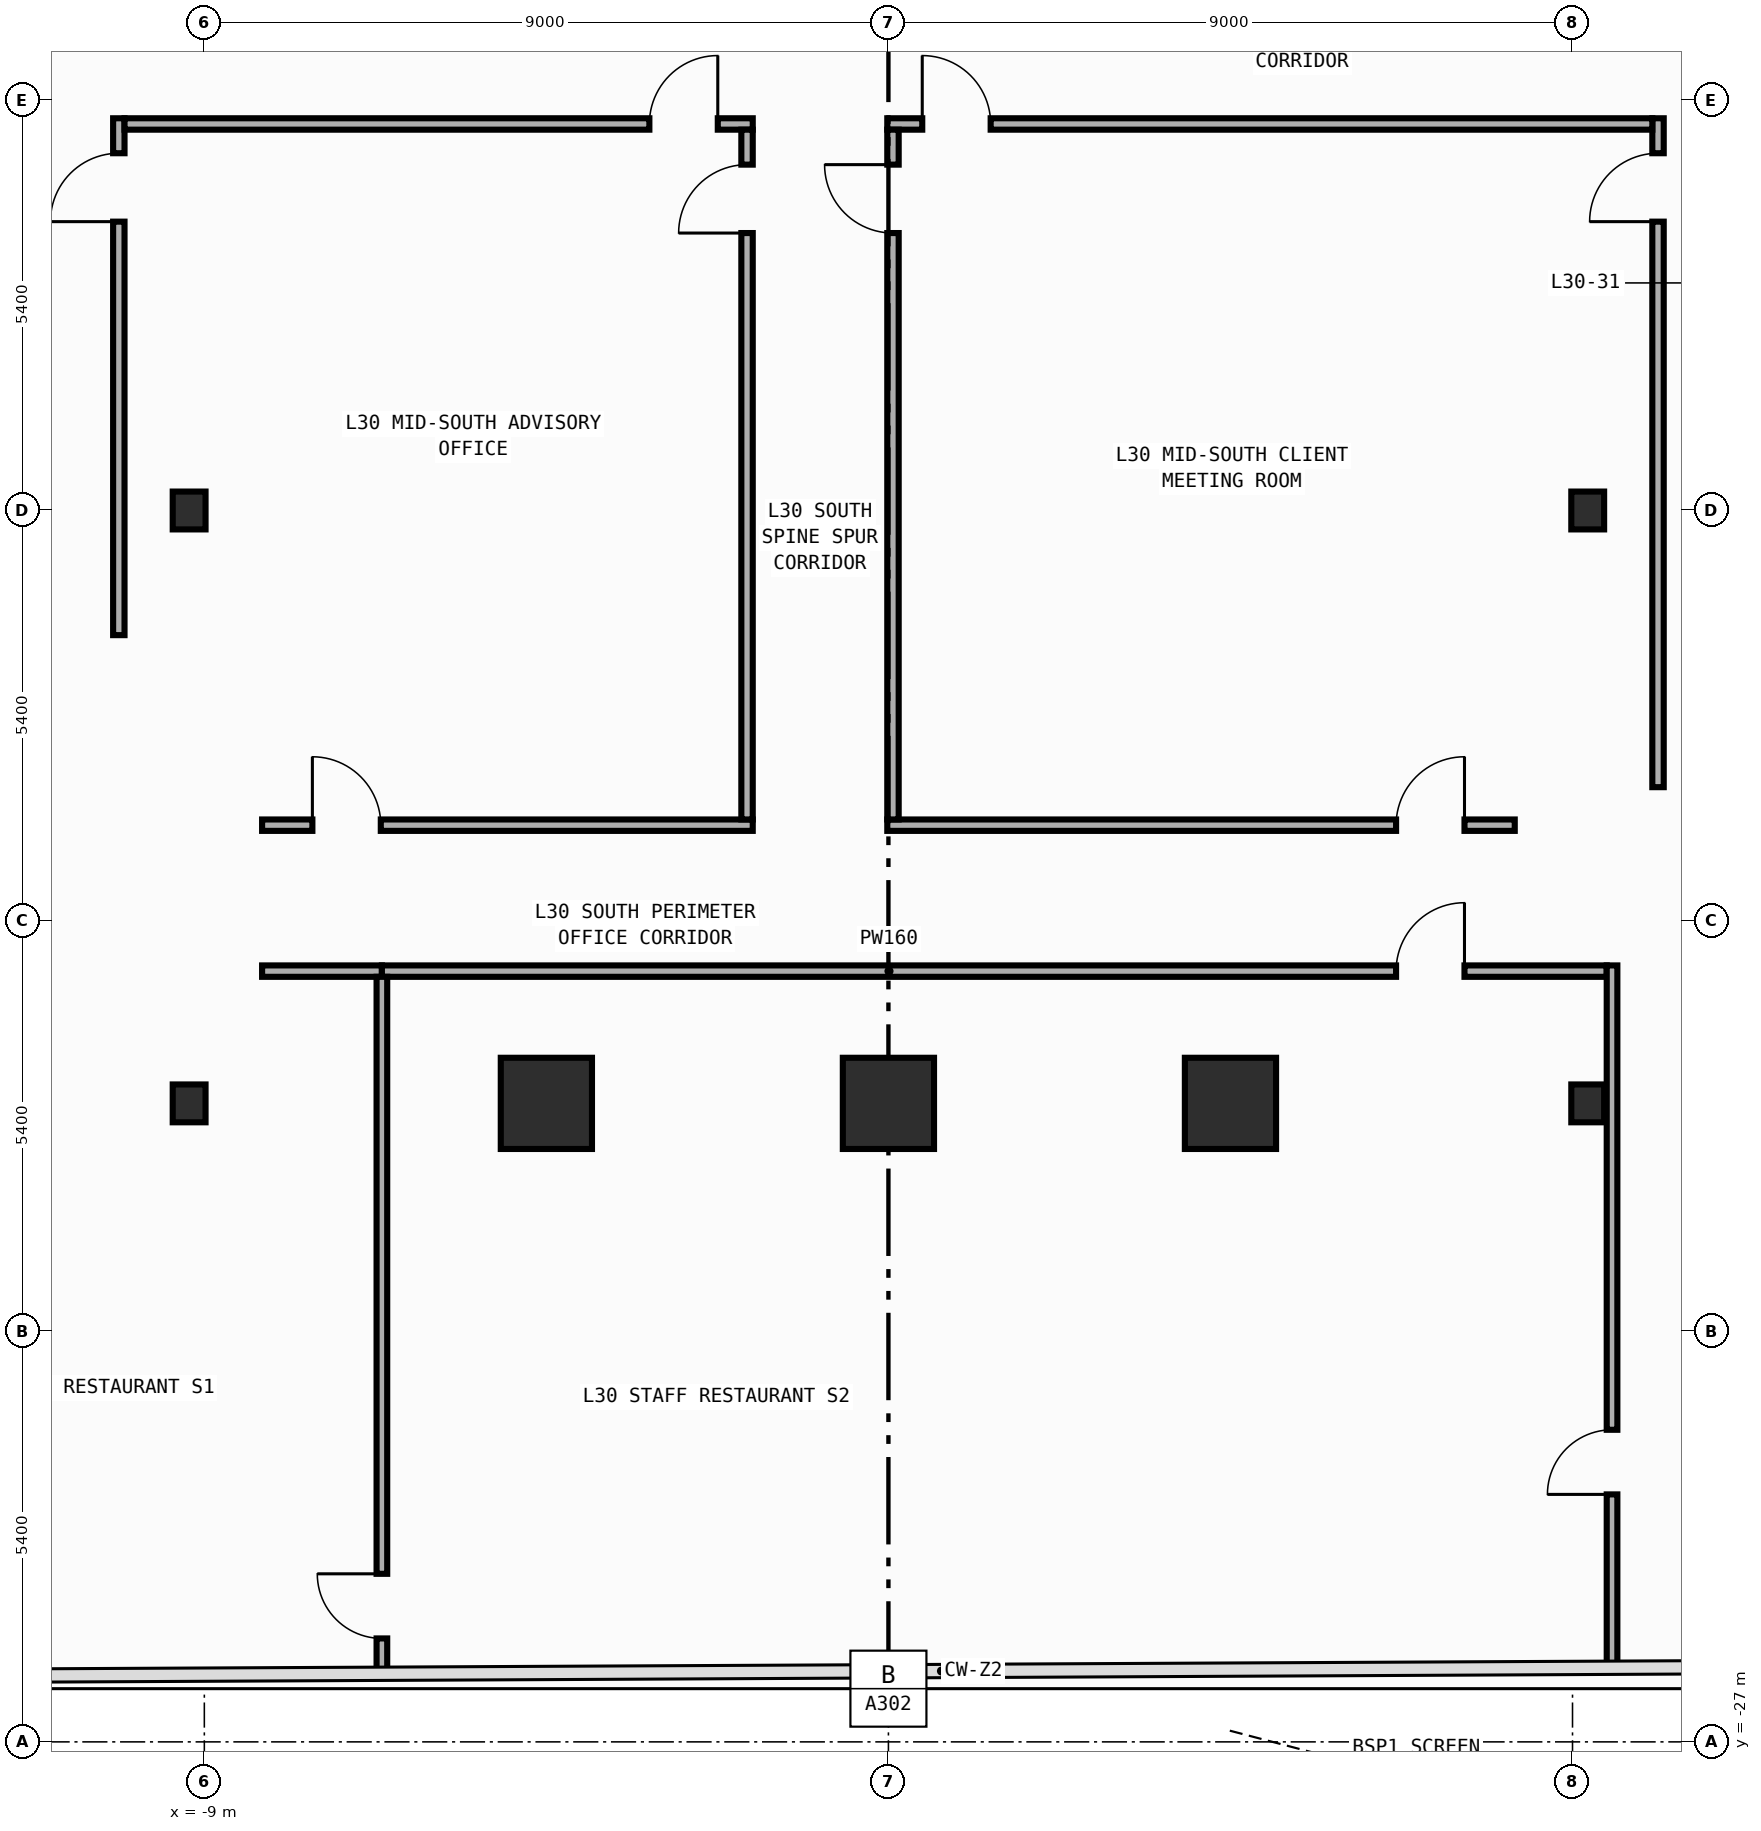
"""IFC4 building model, lengths in metres.
Left out: names, types, materials, properties, quantities, classifications, styles, units other than length and angle.
Written with IfcOpenShell. Run it as: python <this file> out.ifc"""

import sys

from ifc_helpers import new_model, si_unit, direction, frame, frame_2d, origin, origin_2d, place, context, subcontext, project, spatial, rectangle, i_section, extrude, element, fill, save


model = new_model("IFC4")
c1 = context("Model", 3, precision=1e-05, world=origin(), true_north=direction((0.0, 1.0)))
c2 = subcontext(c1, "Body", "Model", "MODEL_VIEW")
j1 = project(units=[si_unit("LENGTHUNIT", "METRE"), si_unit("PLANEANGLEUNIT", "RADIAN")], contexts=[c1])
p1 = place(None, origin())
s1 = spatial("IfcSite", under=j1, at=p1, CompositionType="ELEMENT")
p2 = place(p1, origin())
s2 = spatial("IfcBuilding", under=s1, at=p2, CompositionType="ELEMENT")
p3 = place(p2, frame((0.0, 0.0, 131.0)))
s3 = spatial("IfcBuildingStorey", under=s2, at=p3, CompositionType="ELEMENT", Elevation=131.0)
for number, where, z_axis, x_axis in (
    (1, (-9.2, -18.6, 0.0), (0.0, 0.0, 1.0), (1.0, 0.0, 0.0)),
    (2, (-9.2, -10.8, 0.0), (0.0, 0.0, 1.0), (1.0, 0.0, 0.0)),
    (3, (9.2, -18.6, 0.0), (0.0, 0.0, 1.0), (1.0, 0.0, 0.0)),
    (4, (9.2, -10.8, 0.0), (0.0, 0.0, 1.0), (1.0, 0.0, 0.0)),
):
    element("IfcColumn", number, at=place(p3, frame(where, z_axis=z_axis, x_axis=x_axis)), inside=s3, PredefinedType="COLUMN", context=c2, shape_type="SweptSolid", body=[
        extrude(i_section(OverallWidth=0.432, OverallDepth=0.498, WebThickness=0.045, FlangeThickness=0.07, FilletRadius=0.022, at=origin_2d()), origin(), (0.0, 0.0, 1.0), 4.2),
    ])
for number, where, z_axis, x_axis in (
    (5, (-4.5, -18.6, 0.0), (0.0, 0.0, 1.0), (1.0, 0.0, 0.0)),
    (6, (0.0, -18.6, 0.0), (0.0, 0.0, 1.0), (1.0, 0.0, 0.0)),
    (7, (4.5, -18.6, 0.0), (0.0, 0.0, 1.0), (1.0, 0.0, 0.0)),
):
    element("IfcColumn", number, at=place(p3, frame(where, z_axis=z_axis, x_axis=x_axis)), inside=s3, PredefinedType="COLUMN", context=c2, shape_type="SweptSolid", body=[
        extrude(rectangle(XDim=1.2, YDim=1.2, at=origin_2d()), origin(), (0.0, 0.0, 1.0), 4.2),
    ])
p4 = place(p3, frame((-10.125, -12.44, 0.0), z_axis=(0.0, 0.0, 1.0), x_axis=(0.0, 1.0, 0.0)))
e8 = element("IfcWall", 8, at=p4, inside=s3, PredefinedType="PARTITIONING", context=c2, shape_type="SweptSolid", body=[
    extrude(rectangle(XDim=6.8, YDim=0.15, at=frame_2d((3.4, 0.0))), origin(), (0.0, 0.0, 1.0), 3.94),
])
p5 = place(p4, frame((5.44, 0.0, 0.0)))
e9 = element("IfcOpeningElement", 9, at=p5, cuts=e8, PredefinedType="OPENING", context=c2, shape_type="SweptSolid", body=[
    extrude(rectangle(XDim=0.9, YDim=2.15, at=frame_2d((0.45, 1.075))), frame((0.0, 0.085, 0.0), z_axis=(0.0, -1.0, 0.0), x_axis=(1.0, 0.0, 0.0)), (0.0, 0.0, 1.0), 0.17),
])
p6 = place(p3, frame((10.125, -14.44, 0.0), z_axis=(0.0, 0.0, 1.0), x_axis=(0.0, 1.0, 0.0)))
e10 = element("IfcWall", 10, at=p6, inside=s3, PredefinedType="PARTITIONING", context=c2, shape_type="SweptSolid", body=[
    extrude(rectangle(XDim=8.8, YDim=0.15, at=frame_2d((4.4, 0.0))), origin(), (0.0, 0.0, 1.0), 3.94),
])
p7 = place(p6, frame((7.44, 0.0, 0.0)))
e11 = element("IfcOpeningElement", 11, at=p7, cuts=e10, PredefinedType="OPENING", context=c2, shape_type="SweptSolid", body=[
    extrude(rectangle(XDim=0.9, YDim=2.15, at=frame_2d((0.45, 1.075))), frame((0.0, 0.085, 0.0), z_axis=(0.0, -1.0, 0.0), x_axis=(1.0, 0.0, 0.0)), (0.0, 0.0, 1.0), 0.17),
])
p8 = place(p3, frame((-10.05, -5.715, 0.0), z_axis=(0.0, 0.0, 1.0), x_axis=(1.0, 0.0, 0.0)))
e12 = element("IfcWall", 12, at=p8, inside=s3, PredefinedType="PARTITIONING", context=c2, shape_type="SweptSolid", body=[
    extrude(rectangle(XDim=8.265, YDim=0.15, at=frame_2d((4.133, 0.0))), origin(), (0.0, 0.0, 1.0), 3.94),
])
p9 = place(p8, frame((6.905, 0.0, 0.0)))
e13 = element("IfcOpeningElement", 13, at=p9, cuts=e12, PredefinedType="OPENING", context=c2, shape_type="SweptSolid", body=[
    extrude(rectangle(XDim=0.9, YDim=2.15, at=frame_2d((0.45, 1.075))), frame((0.0, 0.085, 0.0), z_axis=(0.0, -1.0, 0.0), x_axis=(1.0, 0.0, 0.0)), (0.0, 0.0, 1.0), 0.17),
])
p10 = place(p3, frame((-0.015, -5.715, 0.0), z_axis=(0.0, 0.0, 1.0), x_axis=(1.0, 0.0, 0.0)))
e14 = element("IfcWall", 14, at=p10, inside=s3, PredefinedType="PARTITIONING", context=c2, shape_type="SweptSolid", body=[
    extrude(rectangle(XDim=10.065, YDim=0.15, at=frame_2d((5.032, 0.0))), origin(), (0.0, 0.0, 1.0), 3.94),
])
p11 = place(p10, frame((0.46, 0.0, 0.0)))
e15 = element("IfcOpeningElement", 15, at=p11, cuts=e14, PredefinedType="OPENING", context=c2, shape_type="SweptSolid", body=[
    extrude(rectangle(XDim=0.9, YDim=2.15, at=frame_2d((0.45, 1.075))), frame((0.0, 0.085, 0.0), z_axis=(0.0, -1.0, 0.0), x_axis=(1.0, 0.0, 0.0)), (0.0, 0.0, 1.0), 0.17),
])
p12 = place(p3, frame((-8.24, -16.86, 0.0), z_axis=(0.0, 0.0, 1.0), x_axis=(1.0, 0.0, 0.0)))
e16 = element("IfcWall", 16, at=p12, inside=s3, PredefinedType="PARTITIONING", context=c2, shape_type="SweptSolid", body=[
    extrude(rectangle(XDim=1.576, YDim=0.15, at=frame_2d((0.788, 0.0))), origin(), (0.0, 0.0, 1.0), 3.94),
])
p13 = place(p3, frame((-6.664, -16.86, 0.0), z_axis=(0.0, 0.0, 1.0), x_axis=(1.0, 0.0, 0.0)))
e17 = element("IfcWall", 17, at=p13, inside=s3, PredefinedType="PARTITIONING", context=c2, shape_type="SweptSolid", body=[
    extrude(rectangle(XDim=16.114, YDim=0.15, at=frame_2d((8.057, 0.0))), origin(), (0.0, 0.0, 1.0), 3.94),
])
p14 = place(p13, frame((13.343, 0.0, 0.0)))
e18 = element("IfcOpeningElement", 18, at=p14, cuts=e17, PredefinedType="OPENING", context=c2, shape_type="SweptSolid", body=[
    extrude(rectangle(XDim=0.9, YDim=2.15, at=frame_2d((0.45, 1.075))), frame((0.0, 0.085, 0.0), z_axis=(0.0, -1.0, 0.0), x_axis=(1.0, 0.0, 0.0)), (0.0, 0.0, 1.0), 0.17),
])
p15 = place(p3, frame((-8.24, -14.94, 0.0), z_axis=(0.0, 0.0, 1.0), x_axis=(1.0, 0.0, 0.0)))
e19 = element("IfcWall", 19, at=p15, inside=s3, PredefinedType="PARTITIONING", context=c2, shape_type="SweptSolid", body=[
    extrude(rectangle(XDim=6.455, YDim=0.15, at=frame_2d((3.228, 0.0))), origin(), (0.0, 0.0, 1.0), 3.94),
])
p16 = place(p15, frame((0.662, 0.0, 0.0)))
e20 = element("IfcOpeningElement", 20, at=p16, cuts=e19, PredefinedType="OPENING", context=c2, shape_type="SweptSolid", body=[
    extrude(rectangle(XDim=0.9, YDim=2.15, at=frame_2d((0.45, 1.075))), frame((0.0, 0.085, 0.0), z_axis=(0.0, -1.0, 0.0), x_axis=(1.0, 0.0, 0.0)), (0.0, 0.0, 1.0), 0.17),
])
p17 = place(p3, frame((-0.015, -14.94, 0.0), z_axis=(0.0, 0.0, 1.0), x_axis=(1.0, 0.0, 0.0)))
e21 = element("IfcWall", 21, at=p17, inside=s3, PredefinedType="PARTITIONING", context=c2, shape_type="SweptSolid", body=[
    extrude(rectangle(XDim=8.255, YDim=0.15, at=frame_2d((4.127, 0.0))), origin(), (0.0, 0.0, 1.0), 3.94),
])
p18 = place(p17, frame((6.694, 0.0, 0.0)))
e22 = element("IfcOpeningElement", 22, at=p18, cuts=e21, PredefinedType="OPENING", context=c2, shape_type="SweptSolid", body=[
    extrude(rectangle(XDim=0.9, YDim=2.15, at=frame_2d((0.45, 1.075))), frame((0.0, 0.085, 0.0), z_axis=(0.0, -1.0, 0.0), x_axis=(1.0, 0.0, 0.0)), (0.0, 0.0, 1.0), 0.17),
])
p19 = place(p3, frame((-1.86, -14.865, 0.0), z_axis=(0.0, 0.0, 1.0), x_axis=(0.0, 1.0, 0.0)))
e23 = element("IfcWall", 23, at=p19, inside=s3, PredefinedType="PARTITIONING", context=c2, shape_type="SweptSolid", body=[
    extrude(rectangle(XDim=9.075, YDim=0.15, at=frame_2d((4.538, 0.0))), origin(), (0.0, 0.0, 1.0), 3.94),
])
p20 = place(p19, frame((7.715, 0.0, 0.0)))
e24 = element("IfcOpeningElement", 24, at=p20, cuts=e23, PredefinedType="OPENING", context=c2, shape_type="SweptSolid", body=[
    extrude(rectangle(XDim=0.9, YDim=2.15, at=frame_2d((0.45, 1.075))), frame((0.0, 0.085, 0.0), z_axis=(0.0, -1.0, 0.0), x_axis=(1.0, 0.0, 0.0)), (0.0, 0.0, 1.0), 0.17),
])
p21 = place(p3, frame((0.06, -14.865, 0.0), z_axis=(0.0, 0.0, 1.0), x_axis=(0.0, 1.0, 0.0)))
e25 = element("IfcWall", 25, at=p21, inside=s3, PredefinedType="PARTITIONING", context=c2, shape_type="SweptSolid", body=[
    extrude(rectangle(XDim=9.075, YDim=0.15, at=frame_2d((4.538, 0.0))), origin(), (0.0, 0.0, 1.0), 3.94),
])
p22 = place(p21, frame((7.715, 0.0, 0.0)))
e26 = element("IfcOpeningElement", 26, at=p22, cuts=e25, PredefinedType="OPENING", context=c2, shape_type="SweptSolid", body=[
    extrude(rectangle(XDim=0.9, YDim=2.15, at=frame_2d((0.45, 1.075))), frame((0.0, 0.085, 0.0), z_axis=(0.0, -1.0, 0.0), x_axis=(1.0, 0.0, 0.0)), (0.0, 0.0, 1.0), 0.17),
])
p23 = place(p3, frame((-6.664, -26.099, 0.0), z_axis=(0.0, 0.0, 1.0), x_axis=(0.0, 1.0, 0.0)))
e27 = element("IfcWall", 27, at=p23, inside=s3, PredefinedType="PARTITIONING", context=c2, shape_type="SweptSolid", body=[
    extrude(rectangle(XDim=9.164, YDim=0.14, at=frame_2d((4.582, 0.0))), origin(), (0.0, 0.0, 1.0), 3.94),
])
p24 = place(p23, frame((0.46, 0.0, 0.0)))
e28 = element("IfcOpeningElement", 28, at=p24, cuts=e27, PredefinedType="OPENING", context=c2, shape_type="SweptSolid", body=[
    extrude(rectangle(XDim=0.85, YDim=2.1, at=frame_2d((0.425, 1.05))), frame((0.0, 0.08, 0.0), z_axis=(0.0, -1.0, 0.0), x_axis=(1.0, 0.0, 0.0)), (0.0, 0.0, 1.0), 0.16),
])
p25 = place(p3, frame((9.52, -26.02, 0.0), z_axis=(0.0, 0.0, 1.0), x_axis=(0.0, 1.0, 0.0)))
e29 = element("IfcWall", 29, at=p25, inside=s3, PredefinedType="PARTITIONING", context=c2, shape_type="SweptSolid", body=[
    extrude(rectangle(XDim=9.235, YDim=0.14, at=frame_2d((4.618, 0.0))), origin(), (0.0, 0.0, 1.0), 3.24),
])
p26 = place(p25, frame((2.276, 0.0, 0.0)))
e30 = element("IfcOpeningElement", 30, at=p26, cuts=e29, PredefinedType="OPENING", context=c2, shape_type="SweptSolid", body=[
    extrude(rectangle(XDim=0.85, YDim=2.1, at=frame_2d((0.425, 1.05))), frame((0.0, 0.08, 0.0), z_axis=(0.0, -1.0, 0.0), x_axis=(1.0, 0.0, 0.0)), (0.0, 0.0, 1.0), 0.16),
])
p27 = place(p5, origin())
e31 = element("IfcDoor", 31, at=p27, inside=s3, OperationType="SINGLE_SWING_LEFT", PredefinedType="DOOR", context=c2, shape_type="SweptSolid", body=[
    extrude(rectangle(XDim=0.9, YDim=2.15, at=frame_2d((0.45, 1.075))), frame((0.0, 0.025, 0.0), z_axis=(0.0, -1.0, 0.0), x_axis=(1.0, 0.0, 0.0)), (0.0, 0.0, 1.0), 0.05),
])
fill(e9, e31)
p28 = place(p7, origin())
e32 = element("IfcDoor", 32, at=p28, inside=s3, OperationType="SINGLE_SWING_LEFT", PredefinedType="DOOR", context=c2, shape_type="SweptSolid", body=[
    extrude(rectangle(XDim=0.9, YDim=2.15, at=frame_2d((0.45, 1.075))), frame((0.0, 0.025, 0.0), z_axis=(0.0, -1.0, 0.0), x_axis=(1.0, 0.0, 0.0)), (0.0, 0.0, 1.0), 0.05),
])
fill(e11, e32)
p29 = place(p9, origin())
e33 = element("IfcDoor", 33, at=p29, inside=s3, OperationType="SINGLE_SWING_RIGHT", PredefinedType="DOOR", context=c2, shape_type="SweptSolid", body=[
    extrude(rectangle(XDim=0.9, YDim=2.15, at=frame_2d((0.45, 1.075))), frame((0.0, 0.025, 0.0), z_axis=(0.0, -1.0, 0.0), x_axis=(1.0, 0.0, 0.0)), (0.0, 0.0, 1.0), 0.05),
])
fill(e13, e33)
p30 = place(p11, origin())
e34 = element("IfcDoor", 34, at=p30, inside=s3, OperationType="SINGLE_SWING_LEFT", PredefinedType="DOOR", context=c2, shape_type="SweptSolid", body=[
    extrude(rectangle(XDim=0.9, YDim=2.15, at=frame_2d((0.45, 1.075))), frame((0.0, 0.025, 0.0), z_axis=(0.0, -1.0, 0.0), x_axis=(1.0, 0.0, 0.0)), (0.0, 0.0, 1.0), 0.05),
])
fill(e15, e34)
p31 = place(p14, origin())
e35 = element("IfcDoor", 35, at=p31, inside=s3, OperationType="SINGLE_SWING_RIGHT", PredefinedType="DOOR", context=c2, shape_type="SweptSolid", body=[
    extrude(rectangle(XDim=0.9, YDim=2.15, at=frame_2d((0.45, 1.075))), frame((0.0, 0.025, 0.0), z_axis=(0.0, -1.0, 0.0), x_axis=(1.0, 0.0, 0.0)), (0.0, 0.0, 1.0), 0.05),
])
fill(e18, e35)
p32 = place(p16, origin())
e36 = element("IfcDoor", 36, at=p32, inside=s3, OperationType="SINGLE_SWING_LEFT", PredefinedType="DOOR", context=c2, shape_type="SweptSolid", body=[
    extrude(rectangle(XDim=0.9, YDim=2.15, at=frame_2d((0.45, 1.075))), frame((0.0, 0.025, 0.0), z_axis=(0.0, -1.0, 0.0), x_axis=(1.0, 0.0, 0.0)), (0.0, 0.0, 1.0), 0.05),
])
fill(e20, e36)
p33 = place(p18, origin())
e37 = element("IfcDoor", 37, at=p33, inside=s3, OperationType="SINGLE_SWING_RIGHT", PredefinedType="DOOR", context=c2, shape_type="SweptSolid", body=[
    extrude(rectangle(XDim=0.9, YDim=2.15, at=frame_2d((0.45, 1.075))), frame((0.0, 0.025, 0.0), z_axis=(0.0, -1.0, 0.0), x_axis=(1.0, 0.0, 0.0)), (0.0, 0.0, 1.0), 0.05),
])
fill(e22, e37)
p34 = place(p20, origin())
e38 = element("IfcDoor", 38, at=p34, inside=s3, OperationType="SINGLE_SWING_LEFT", PredefinedType="DOOR", context=c2, shape_type="SweptSolid", body=[
    extrude(rectangle(XDim=0.9, YDim=2.15, at=frame_2d((0.45, 1.075))), frame((0.0, 0.025, 0.0), z_axis=(0.0, -1.0, 0.0), x_axis=(1.0, 0.0, 0.0)), (0.0, 0.0, 1.0), 0.05),
])
fill(e24, e38)
p35 = place(p22, origin())
e39 = element("IfcDoor", 39, at=p35, inside=s3, OperationType="SINGLE_SWING_RIGHT", PredefinedType="DOOR", context=c2, shape_type="SweptSolid", body=[
    extrude(rectangle(XDim=0.9, YDim=2.15, at=frame_2d((0.45, 1.075))), frame((0.0, 0.025, 0.0), z_axis=(0.0, -1.0, 0.0), x_axis=(1.0, 0.0, 0.0)), (0.0, 0.0, 1.0), 0.05),
])
fill(e26, e39)
p36 = place(p26, origin())
e40 = element("IfcDoor", 40, at=p36, inside=s3, OperationType="SINGLE_SWING_LEFT", PredefinedType="DOOR", context=c2, shape_type="SweptSolid", body=[
    extrude(rectangle(XDim=0.85, YDim=2.1, at=frame_2d((0.425, 1.05))), frame((0.0, 0.025, 0.0), z_axis=(0.0, -1.0, 0.0), x_axis=(1.0, 0.0, 0.0)), (0.0, 0.0, 1.0), 0.05),
])
fill(e30, e40)
p37 = place(p24, origin())
e41 = element("IfcDoor", 41, at=p37, inside=s3, OperationType="SINGLE_SWING_RIGHT", PredefinedType="DOOR", context=c2, shape_type="SweptSolid", body=[
    extrude(rectangle(XDim=0.85, YDim=2.1, at=frame_2d((0.425, 1.05))), frame((0.0, 0.025, 0.0), z_axis=(0.0, -1.0, 0.0), x_axis=(1.0, 0.0, 0.0)), (0.0, 0.0, 1.0), 0.05),
])
fill(e28, e41)
save(model, sys.argv[1])
